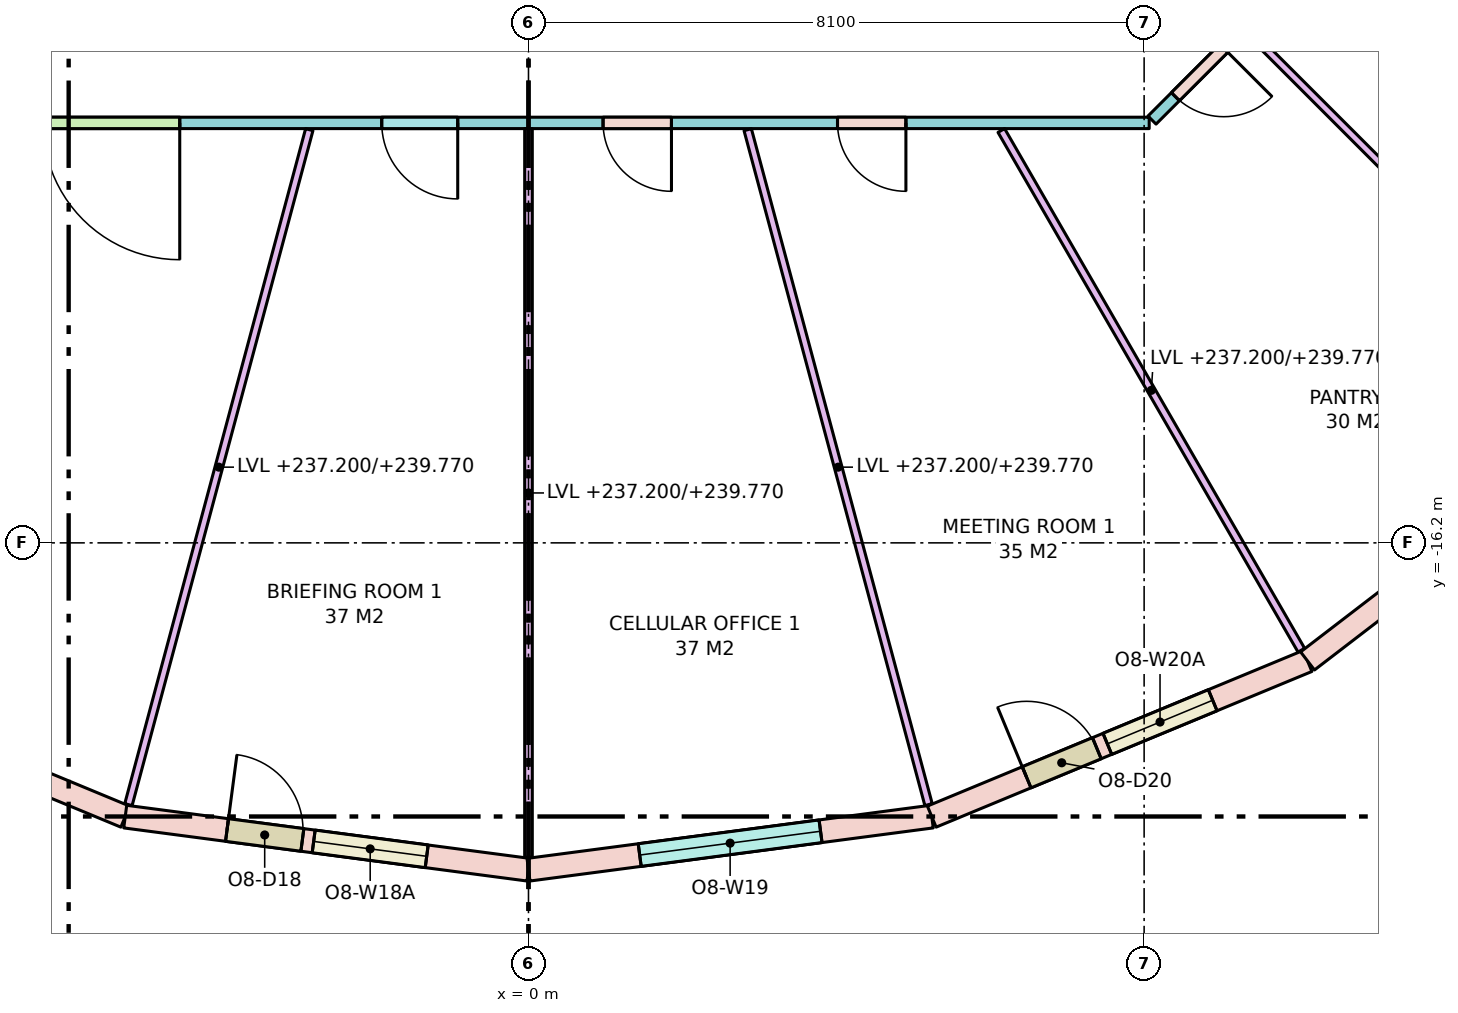
"""IFC4 building model, lengths in metres.
Left out: names, types, materials, properties, quantities, classifications, styles, units other than length and angle.
Written with IfcOpenShell. Run it as: python <this file> out.ifc"""

import sys

from ifc_helpers import new_model, si_unit, direction, frame, frame_2d, origin, place, context, subcontext, project, spatial, rectangle, extrude, element, fill, save


model = new_model("IFC4")
c1 = context("Model", 3, precision=1e-05, world=origin(), true_north=direction((0.0, 1.0)))
c2 = subcontext(c1, "Body", "Model", "MODEL_VIEW")
j1 = project(units=[si_unit("LENGTHUNIT", "METRE"), si_unit("PLANEANGLEUNIT", "RADIAN")], contexts=[c1])
p1 = place(None, origin())
s1 = spatial("IfcSite", under=j1, at=p1, CompositionType="ELEMENT")
p2 = place(p1, origin())
s2 = spatial("IfcBuilding", under=s1, at=p2, CompositionType="ELEMENT")
p3 = place(p2, frame((0.0, 0.0, 237.2)))
s3 = spatial("IfcBuildingStorey", under=s2, at=p3, CompositionType="ELEMENT", Elevation=237.2)
p4 = place(p3, frame((-10.25, -17.753, 0.0), z_axis=(0.0, 0.0, 1.0), x_axis=(0.923867255172, -0.382713071139, 0.0)))
e1 = element("IfcWall", 1, at=p4, inside=s3, PredefinedType="STANDARD", context=c2, shape_type="SweptSolid", body=[
    extrude(rectangle(XDim=5.352, YDim=0.3, at=frame_2d((2.676, 0.0))), origin(), (0.0, 0.0, 1.0), 3.42),
])
p5 = place(p4, frame((1.476, 0.0, 0.8)))
e2 = element("IfcOpeningElement", 2, at=p5, cuts=e1, PredefinedType="OPENING", context=c2, shape_type="SweptSolid", body=[
    extrude(rectangle(XDim=2.4, YDim=2.4, at=frame_2d((1.2, 1.2))), frame((0.0, 0.16, 0.0), z_axis=(0.0, -1.0, 0.0), x_axis=(1.0, 0.0, 0.0)), (0.0, 0.0, 1.0), 0.32),
])
p6 = place(p3, frame((-5.306, -19.802, 0.0), z_axis=(0.0, 0.0, 1.0), x_axis=(0.991446064069, -0.130517056518, 0.0)))
e3 = element("IfcWall", 3, at=p6, inside=s3, PredefinedType="STANDARD", context=c2, shape_type="SweptSolid", body=[
    extrude(rectangle(XDim=5.352, YDim=0.3, at=frame_2d((2.676, 0.0))), origin(), (0.0, 0.0, 1.0), 3.42),
])
p7 = place(p6, frame((1.351, 0.0, 0.0)))
e4 = element("IfcOpeningElement", 4, at=p7, cuts=e3, PredefinedType="OPENING", context=c2, shape_type="SweptSolid", body=[
    extrude(rectangle(XDim=1.0, YDim=2.4, at=frame_2d((0.5, 1.2))), frame((0.0, 0.16, 0.0), z_axis=(0.0, -1.0, 0.0), x_axis=(1.0, 0.0, 0.0)), (0.0, 0.0, 1.0), 0.32),
])
p8 = place(p6, frame((2.501, 0.0, 0.8)))
e5 = element("IfcOpeningElement", 5, at=p8, cuts=e3, PredefinedType="OPENING", context=c2, shape_type="SweptSolid", body=[
    extrude(rectangle(XDim=1.5, YDim=2.4, at=frame_2d((0.75, 1.2))), frame((0.0, 0.16, 0.0), z_axis=(0.0, -1.0, 0.0), x_axis=(1.0, 0.0, 0.0)), (0.0, 0.0, 1.0), 0.32),
])
p9 = place(p3, frame((0.0, -20.5, 0.0), z_axis=(0.0, 0.0, 1.0), x_axis=(0.991446064069, 0.130517056518, 0.0)))
e6 = element("IfcWall", 6, at=p9, inside=s3, PredefinedType="STANDARD", context=c2, shape_type="SweptSolid", body=[
    extrude(rectangle(XDim=5.352, YDim=0.3, at=frame_2d((2.676, 0.0))), origin(), (0.0, 0.0, 1.0), 3.42),
])
p10 = place(p9, frame((1.476, 0.0, 0.8)))
e7 = element("IfcOpeningElement", 7, at=p10, cuts=e6, PredefinedType="OPENING", context=c2, shape_type="SweptSolid", body=[
    extrude(rectangle(XDim=2.4, YDim=2.4, at=frame_2d((1.2, 1.2))), frame((0.0, 0.16, 0.0), z_axis=(0.0, -1.0, 0.0), x_axis=(1.0, 0.0, 0.0)), (0.0, 0.0, 1.0), 0.32),
])
p11 = place(p3, frame((5.306, -19.802, 0.0), z_axis=(0.0, 0.0, 1.0), x_axis=(0.923867255172, 0.382713071139, 0.0)))
e8 = element("IfcWall", 8, at=p11, inside=s3, PredefinedType="STANDARD", context=c2, shape_type="SweptSolid", body=[
    extrude(rectangle(XDim=5.352, YDim=0.3, at=frame_2d((2.676, 0.0))), origin(), (0.0, 0.0, 1.0), 3.42),
])
p12 = place(p11, frame((1.351, 0.0, 0.0)))
e9 = element("IfcOpeningElement", 9, at=p12, cuts=e8, PredefinedType="OPENING", context=c2, shape_type="SweptSolid", body=[
    extrude(rectangle(XDim=1.0, YDim=2.4, at=frame_2d((0.5, 1.2))), frame((0.0, 0.16, 0.0), z_axis=(0.0, -1.0, 0.0), x_axis=(1.0, 0.0, 0.0)), (0.0, 0.0, 1.0), 0.32),
])
p13 = place(p11, frame((2.501, 0.0, 0.8)))
e10 = element("IfcOpeningElement", 10, at=p13, cuts=e8, PredefinedType="OPENING", context=c2, shape_type="SweptSolid", body=[
    extrude(rectangle(XDim=1.5, YDim=2.4, at=frame_2d((0.75, 1.2))), frame((0.0, 0.16, 0.0), z_axis=(0.0, -1.0, 0.0), x_axis=(1.0, 0.0, 0.0)), (0.0, 0.0, 1.0), 0.32),
])
p14 = place(p3, frame((10.25, -17.753, 0.0), z_axis=(0.0, 0.0, 1.0), x_axis=(0.793349293227, 0.60876670321, 0.0)))
e11 = element("IfcWall", 11, at=p14, inside=s3, PredefinedType="STANDARD", context=c2, shape_type="SweptSolid", body=[
    extrude(rectangle(XDim=5.352, YDim=0.3, at=frame_2d((2.676, 0.0))), origin(), (0.0, 0.0, 1.0), 3.42),
])
p15 = place(p14, frame((1.476, 0.0, 0.8)))
e12 = element("IfcOpeningElement", 12, at=p15, cuts=e11, PredefinedType="OPENING", context=c2, shape_type="SweptSolid", body=[
    extrude(rectangle(XDim=2.4, YDim=2.4, at=frame_2d((1.2, 1.2))), frame((0.0, 0.16, 0.0), z_axis=(0.0, -1.0, 0.0), x_axis=(1.0, 0.0, 0.0)), (0.0, 0.0, 1.0), 0.32),
])
p16 = place(p3, frame((12.638, -6.204, 0.0), z_axis=(0.0, 0.0, 1.0), x_axis=(-0.707106781187, -0.707106781187, 0.0)))
e13 = element("IfcWall", 13, at=p16, inside=s3, PredefinedType="PARTITIONING", context=c2, shape_type="SweptSolid", body=[
    extrude(rectangle(XDim=6.271, YDim=0.15, at=frame_2d((3.135, 0.0))), origin(), (0.0, 0.0, 1.0), 2.57),
])
p17 = place(p16, frame((4.935, 0.0, 0.0)))
e14 = element("IfcOpeningElement", 14, at=p17, cuts=e13, PredefinedType="OPENING", context=c2, shape_type="SweptSolid", body=[
    extrude(rectangle(XDim=0.9, YDim=2.1, at=frame_2d((0.45, 1.05))), frame((0.0, 0.085, 0.0), z_axis=(0.0, -1.0, 0.0), x_axis=(1.0, 0.0, 0.0)), (0.0, 0.0, 1.0), 0.17),
])
p18 = place(p3, frame((8.167, -10.675, 0.0), z_axis=(0.0, 0.0, 1.0), x_axis=(-1.0, 0.0, 0.0)))
e15 = element("IfcWall", 15, at=p18, inside=s3, PredefinedType="PARTITIONING", context=c2, shape_type="SweptSolid", body=[
    extrude(rectangle(XDim=16.333, YDim=0.15, at=frame_2d((8.167, 0.0))), origin(), (0.0, 0.0, 1.0), 2.57),
])
p19 = place(p18, frame((12.755, 0.0, 0.0)))
e16 = element("IfcOpeningElement", 16, at=p19, cuts=e15, PredefinedType="OPENING", context=c2, shape_type="SweptSolid", body=[
    extrude(rectangle(XDim=1.8, YDim=2.1, at=frame_2d((0.9, 1.05))), frame((0.0, 0.085, 0.0), z_axis=(0.0, -1.0, 0.0), x_axis=(1.0, 0.0, 0.0)), (0.0, 0.0, 1.0), 0.17),
])
p20 = place(p18, frame((9.098, 0.0, 0.0)))
e17 = element("IfcOpeningElement", 17, at=p20, cuts=e15, PredefinedType="OPENING", context=c2, shape_type="SweptSolid", body=[
    extrude(rectangle(XDim=1.0, YDim=2.1, at=frame_2d((0.5, 1.05))), frame((0.0, 0.085, 0.0), z_axis=(0.0, -1.0, 0.0), x_axis=(1.0, 0.0, 0.0)), (0.0, 0.0, 1.0), 0.17),
])
p21 = place(p18, frame((6.285, 0.0, 0.0)))
e18 = element("IfcOpeningElement", 18, at=p21, cuts=e15, PredefinedType="OPENING", context=c2, shape_type="SweptSolid", body=[
    extrude(rectangle(XDim=0.9, YDim=2.1, at=frame_2d((0.45, 1.05))), frame((0.0, 0.085, 0.0), z_axis=(0.0, -1.0, 0.0), x_axis=(1.0, 0.0, 0.0)), (0.0, 0.0, 1.0), 0.17),
])
p22 = place(p18, frame((3.201, 0.0, 0.0)))
e19 = element("IfcOpeningElement", 19, at=p22, cuts=e15, PredefinedType="OPENING", context=c2, shape_type="SweptSolid", body=[
    extrude(rectangle(XDim=0.9, YDim=2.1, at=frame_2d((0.45, 1.05))), frame((0.0, 0.085, 0.0), z_axis=(0.0, -1.0, 0.0), x_axis=(1.0, 0.0, 0.0)), (0.0, 0.0, 1.0), 0.17),
])
p23 = place(p3, frame((-2.884, -10.764, 0.0), z_axis=(0.0, 0.0, 1.0), x_axis=(-0.258811310764, -0.965927898666, 0.0)))
e20 = element("IfcWall", 20, at=p23, inside=s3, PredefinedType="PARTITIONING", context=c2, shape_type="SweptSolid", body=[
    extrude(rectangle(XDim=9.193, YDim=0.1, at=frame_2d((4.596, 0.0))), origin(), (0.0, 0.0, 1.0), 2.57),
])
p24 = place(p3, frame((0.0, -10.75, 0.0), z_axis=(0.0, 0.0, 1.0), x_axis=(0.0, -1.0, 0.0)))
e21 = element("IfcWall", 21, at=p24, inside=s3, PredefinedType="PARTITIONING", context=c2, shape_type="SweptSolid", body=[
    extrude(rectangle(XDim=9.587, YDim=0.1, at=frame_2d((4.793, 0.0))), origin(), (0.0, 0.0, 1.0), 2.57),
])
p25 = place(p3, frame((2.884, -10.764, 0.0), z_axis=(0.0, 0.0, 1.0), x_axis=(0.258811310764, -0.965927898666, 0.0)))
e22 = element("IfcWall", 22, at=p25, inside=s3, PredefinedType="PARTITIONING", context=c2, shape_type="SweptSolid", body=[
    extrude(rectangle(XDim=9.193, YDim=0.1, at=frame_2d((4.596, 0.0))), origin(), (0.0, 0.0, 1.0), 2.57),
])
p26 = place(p3, frame((6.221, -10.775, 0.0), z_axis=(0.0, 0.0, 1.0), x_axis=(0.500016891966, -0.866015650984, 0.0)))
e23 = element("IfcWall", 23, at=p26, inside=s3, PredefinedType="PARTITIONING", context=c2, shape_type="SweptSolid", body=[
    extrude(rectangle(XDim=7.895, YDim=0.1, at=frame_2d((3.948, 0.0))), origin(), (0.0, 0.0, 1.0), 2.57),
])
p27 = place(p3, frame((9.474, -9.474, 0.0), z_axis=(0.0, 0.0, 1.0), x_axis=(0.707106781187, -0.707106781187, 0.0)))
e24 = element("IfcWall", 24, at=p27, inside=s3, PredefinedType="PARTITIONING", context=c2, shape_type="SweptSolid", body=[
    extrude(rectangle(XDim=6.938, YDim=0.1, at=frame_2d((3.469, 0.0))), origin(), (0.0, 0.0, 1.0), 2.57),
])
p28 = place(p7, origin())
e25 = element("IfcDoor", 25, at=p28, inside=s3, OperationType="SINGLE_SWING_LEFT", PredefinedType="DOOR", context=c2, shape_type="SweptSolid", body=[
    extrude(rectangle(XDim=1.0, YDim=2.4, at=frame_2d((0.5, 1.2))), frame((0.0, 0.025, 0.0), z_axis=(0.0, -1.0, 0.0), x_axis=(1.0, 0.0, 0.0)), (0.0, 0.0, 1.0), 0.05),
])
fill(e4, e25)
p29 = place(p8, origin())
e26 = element("IfcWindow", 26, at=p29, inside=s3, PartitioningType="SINGLE_PANEL", PredefinedType="WINDOW", context=c2, shape_type="SweptSolid", body=[
    extrude(rectangle(XDim=1.5, YDim=2.4, at=frame_2d((0.75, 1.2))), frame((0.0, 0.03, 0.0), z_axis=(0.0, -1.0, 0.0), x_axis=(1.0, 0.0, 0.0)), (0.0, 0.0, 1.0), 0.06),
])
fill(e5, e26)
p30 = place(p10, origin())
e27 = element("IfcWindow", 27, at=p30, inside=s3, PartitioningType="SINGLE_PANEL", PredefinedType="WINDOW", context=c2, shape_type="SweptSolid", body=[
    extrude(rectangle(XDim=2.4, YDim=2.4, at=frame_2d((1.2, 1.2))), frame((0.0, 0.03, 0.0), z_axis=(0.0, -1.0, 0.0), x_axis=(1.0, 0.0, 0.0)), (0.0, 0.0, 1.0), 0.06),
])
fill(e7, e27)
p31 = place(p12, origin())
e28 = element("IfcDoor", 28, at=p31, inside=s3, OperationType="SINGLE_SWING_LEFT", PredefinedType="DOOR", context=c2, shape_type="SweptSolid", body=[
    extrude(rectangle(XDim=1.0, YDim=2.4, at=frame_2d((0.5, 1.2))), frame((0.0, 0.025, 0.0), z_axis=(0.0, -1.0, 0.0), x_axis=(1.0, 0.0, 0.0)), (0.0, 0.0, 1.0), 0.05),
])
fill(e9, e28)
p32 = place(p13, origin())
e29 = element("IfcWindow", 29, at=p32, inside=s3, PartitioningType="SINGLE_PANEL", PredefinedType="WINDOW", context=c2, shape_type="SweptSolid", body=[
    extrude(rectangle(XDim=1.5, YDim=2.4, at=frame_2d((0.75, 1.2))), frame((0.0, 0.03, 0.0), z_axis=(0.0, -1.0, 0.0), x_axis=(1.0, 0.0, 0.0)), (0.0, 0.0, 1.0), 0.06),
])
fill(e10, e29)
p33 = place(p19, origin())
e30 = element("IfcDoor", 30, at=p33, inside=s3, OperationType="DOUBLE_DOOR_SINGLE_SWING", PredefinedType="DOOR", context=c2, shape_type="SweptSolid", body=[
    extrude(rectangle(XDim=1.8, YDim=2.1, at=frame_2d((0.9, 1.05))), frame((0.0, 0.025, 0.0), z_axis=(0.0, -1.0, 0.0), x_axis=(1.0, 0.0, 0.0)), (0.0, 0.0, 1.0), 0.05),
])
fill(e16, e30)
p34 = place(p20, origin())
e31 = element("IfcDoor", 31, at=p34, inside=s3, OperationType="SINGLE_SWING_LEFT", PredefinedType="DOOR", context=c2, shape_type="SweptSolid", body=[
    extrude(rectangle(XDim=1.0, YDim=2.1, at=frame_2d((0.5, 1.05))), frame((0.0, 0.025, 0.0), z_axis=(0.0, -1.0, 0.0), x_axis=(1.0, 0.0, 0.0)), (0.0, 0.0, 1.0), 0.05),
])
fill(e17, e31)
p35 = place(p21, origin())
e32 = element("IfcDoor", 32, at=p35, inside=s3, OperationType="SINGLE_SWING_LEFT", PredefinedType="DOOR", context=c2, shape_type="SweptSolid", body=[
    extrude(rectangle(XDim=0.9, YDim=2.1, at=frame_2d((0.45, 1.05))), frame((0.0, 0.025, 0.0), z_axis=(0.0, -1.0, 0.0), x_axis=(1.0, 0.0, 0.0)), (0.0, 0.0, 1.0), 0.05),
])
fill(e18, e32)
p36 = place(p22, origin())
e33 = element("IfcDoor", 33, at=p36, inside=s3, OperationType="SINGLE_SWING_LEFT", PredefinedType="DOOR", context=c2, shape_type="SweptSolid", body=[
    extrude(rectangle(XDim=0.9, YDim=2.1, at=frame_2d((0.45, 1.05))), frame((0.0, 0.025, 0.0), z_axis=(0.0, -1.0, 0.0), x_axis=(1.0, 0.0, 0.0)), (0.0, 0.0, 1.0), 0.05),
])
fill(e19, e33)
p37 = place(p17, origin())
e34 = element("IfcDoor", 34, at=p37, inside=s3, OperationType="SINGLE_SWING_LEFT", PredefinedType="DOOR", context=c2, shape_type="SweptSolid", body=[
    extrude(rectangle(XDim=0.9, YDim=2.1, at=frame_2d((0.45, 1.05))), frame((0.0, 0.025, 0.0), z_axis=(0.0, -1.0, 0.0), x_axis=(1.0, 0.0, 0.0)), (0.0, 0.0, 1.0), 0.05),
])
fill(e14, e34)
save(model, sys.argv[1])
